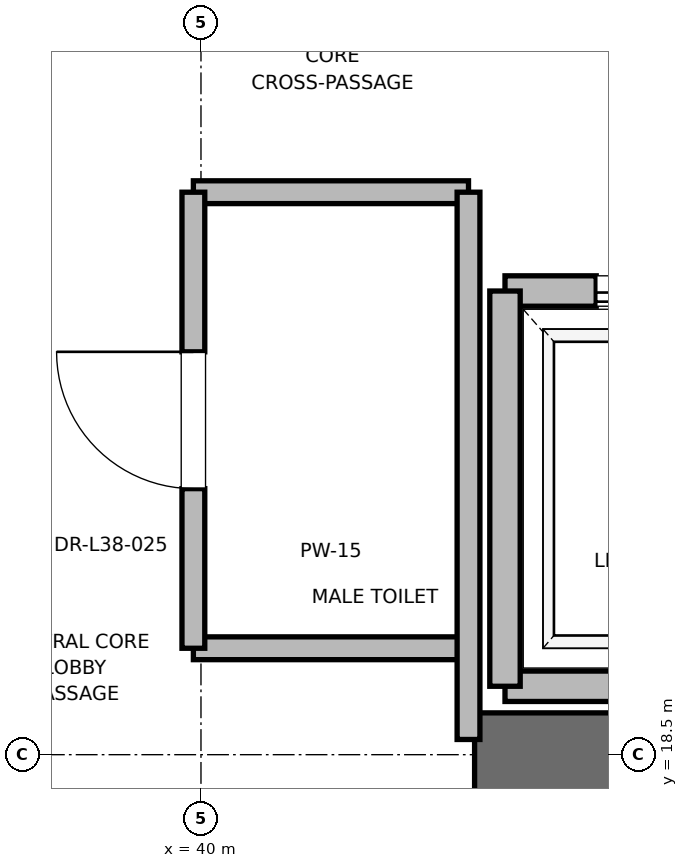
"""IFC4 building model, lengths in metres.
Left out: names, types, materials, properties, quantities, classifications, styles, units other than length and angle.
Written with IfcOpenShell. Run it as: python <this file> out.ifc"""

import sys

from ifc_helpers import new_model, si_unit, direction, frame, frame_2d, origin, place, context, subcontext, project, spatial, rectangle, extrude, element, fill, save


model = new_model("IFC4")
c1 = context("Model", 3, precision=1e-05, world=origin(), true_north=direction((0.0, 1.0)))
c2 = subcontext(c1, "Body", "Model", "MODEL_VIEW")
j1 = project(units=[si_unit("LENGTHUNIT", "METRE"), si_unit("PLANEANGLEUNIT", "RADIAN")], contexts=[c1])
p1 = place(None, origin())
s1 = spatial("IfcSite", under=j1, at=p1, CompositionType="ELEMENT")
p2 = place(p1, origin())
s2 = spatial("IfcBuilding", under=s1, at=p2, CompositionType="ELEMENT")
p3 = place(p2, frame((0.0, 0.0, 164.4)))
s3 = spatial("IfcBuildingStorey", under=s2, at=p3, CompositionType="ELEMENT", Elevation=164.4)
p4 = place(p3, frame((41.8, 18.5, 0.0), z_axis=(0.0, 0.0, 1.0), x_axis=(1.0, 0.0, 0.0)))
e1 = element("IfcWall", 1, at=p4, inside=s3, PredefinedType="SHEAR", context=c2, shape_type="SweptSolid", body=[
    extrude(rectangle(XDim=9.2, YDim=0.55, at=frame_2d((4.6, 0.0))), origin(), (0.0, 0.0, 1.0), 3.775),
])
p5 = place(p3, frame((42.0, 18.95, 0.0), z_axis=(0.0, 0.0, 1.0), x_axis=(1.0, 0.0, 0.0)))
e2 = element("IfcWall", 2, at=p5, inside=s3, PredefinedType="SOLIDWALL", context=c2, shape_type="SweptSolid", body=[
    extrude(rectangle(XDim=2.3, YDim=0.2, at=frame_2d((1.15, 0.0))), origin(), (0.0, 0.0, 1.0), 2.755),
])
p6 = place(p3, frame((44.3, 21.55, 0.0), z_axis=(0.0, 0.0, 1.0), x_axis=(-1.0, 0.0, 0.0)))
e3 = element("IfcWall", 3, at=p6, inside=s3, PredefinedType="SOLIDWALL", context=c2, shape_type="SweptSolid", body=[
    extrude(rectangle(XDim=2.3, YDim=0.2, at=frame_2d((1.15, 0.0))), origin(), (0.0, 0.0, 1.0), 3.775),
])
p7 = place(p6, frame((0.6, 0.0, 0.0)))
e4 = element("IfcOpeningElement", 4, at=p7, cuts=e3, PredefinedType="OPENING", context=c2, shape_type="SweptSolid", body=[
    extrude(rectangle(XDim=1.1, YDim=2.2, at=frame_2d((0.55, 1.1))), frame((0.0, 0.1, 0.0), z_axis=(0.0, -1.0, 0.0), x_axis=(1.0, 0.0, 0.0)), (0.0, 0.0, 1.0), 0.2),
])
p8 = place(p3, frame((42.0, 21.55, 0.0), z_axis=(0.0, 0.0, 1.0), x_axis=(0.0, -1.0, 0.0)))
e5 = element("IfcWall", 5, at=p8, inside=s3, PredefinedType="SOLIDWALL", context=c2, shape_type="SweptSolid", body=[
    extrude(rectangle(XDim=2.6, YDim=0.2, at=frame_2d((1.3, 0.0))), origin(), (0.0, 0.0, 1.0), 2.755),
])
for number, where, z_axis, x_axis in (
    (6, (39.95, 19.2, 0.0), (0.0, 0.0, 1.0), (1.0, 0.0, 0.0)),
    (7, (39.95, 22.2, 0.0), (0.0, 0.0, 1.0), (1.0, 0.0, 0.0)),
):
    element("IfcWall", number, at=place(p3, frame(where, z_axis=z_axis, x_axis=x_axis)), inside=s3, PredefinedType="PARTITIONING", context=c2, shape_type="SweptSolid", body=[
        extrude(rectangle(XDim=1.81, YDim=0.15, at=frame_2d((0.905, 0.0))), origin(), (0.0, 0.0, 1.0), 2.85),
    ])
p9 = place(p3, frame((41.76, 18.6, 0.0), z_axis=(0.0, 0.0, 1.0), x_axis=(0.0, 1.0, 0.0)))
e8 = element("IfcWall", 8, at=p9, inside=s3, PredefinedType="PARTITIONING", context=c2, shape_type="SweptSolid", body=[
    extrude(rectangle(XDim=3.6, YDim=0.15, at=frame_2d((1.8, 0.0))), origin(), (0.0, 0.0, 1.0), 2.755),
])
p10 = place(p3, frame((39.95, 19.2, 0.0), z_axis=(0.0, 0.0, 1.0), x_axis=(0.0, 1.0, 0.0)))
e9 = element("IfcWall", 9, at=p10, inside=s3, PredefinedType="PARTITIONING", context=c2, shape_type="SweptSolid", body=[
    extrude(rectangle(XDim=3.0, YDim=0.15, at=frame_2d((1.5, 0.0))), origin(), (0.0, 0.0, 1.0), 2.85),
])
p11 = place(p10, frame((1.05, 0.0, 0.0)))
e10 = element("IfcOpeningElement", 10, at=p11, cuts=e9, PredefinedType="OPENING", context=c2, shape_type="SweptSolid", body=[
    extrude(rectangle(XDim=0.9, YDim=2.1, at=frame_2d((0.45, 1.05))), frame((0.0, 0.075, 0.0), z_axis=(0.0, -1.0, 0.0), x_axis=(1.0, 0.0, 0.0)), (0.0, 0.0, 1.0), 0.15),
])
p12 = place(p7, origin())
e11 = element("IfcDoor", 11, at=p12, inside=s3, OperationType="SLIDING_TO_RIGHT", PredefinedType="DOOR", context=c2, shape_type="SweptSolid", body=[
    extrude(rectangle(XDim=1.1, YDim=2.2, at=frame_2d((0.55, 1.1))), frame((0.0, 0.025, 0.0), z_axis=(0.0, -1.0, 0.0), x_axis=(1.0, 0.0, 0.0)), (0.0, 0.0, 1.0), 0.05),
])
fill(e4, e11)
p13 = place(p11, origin())
e12 = element("IfcDoor", 12, at=p13, inside=s3, OperationType="SINGLE_SWING_RIGHT", PredefinedType="DOOR", context=c2, shape_type="SweptSolid", body=[
    extrude(rectangle(XDim=0.9, YDim=2.1, at=frame_2d((0.45, 1.05))), frame((0.0, 0.025, 0.0), z_axis=(0.0, -1.0, 0.0), x_axis=(1.0, 0.0, 0.0)), (0.0, 0.0, 1.0), 0.05),
])
fill(e10, e12)
save(model, sys.argv[1])
